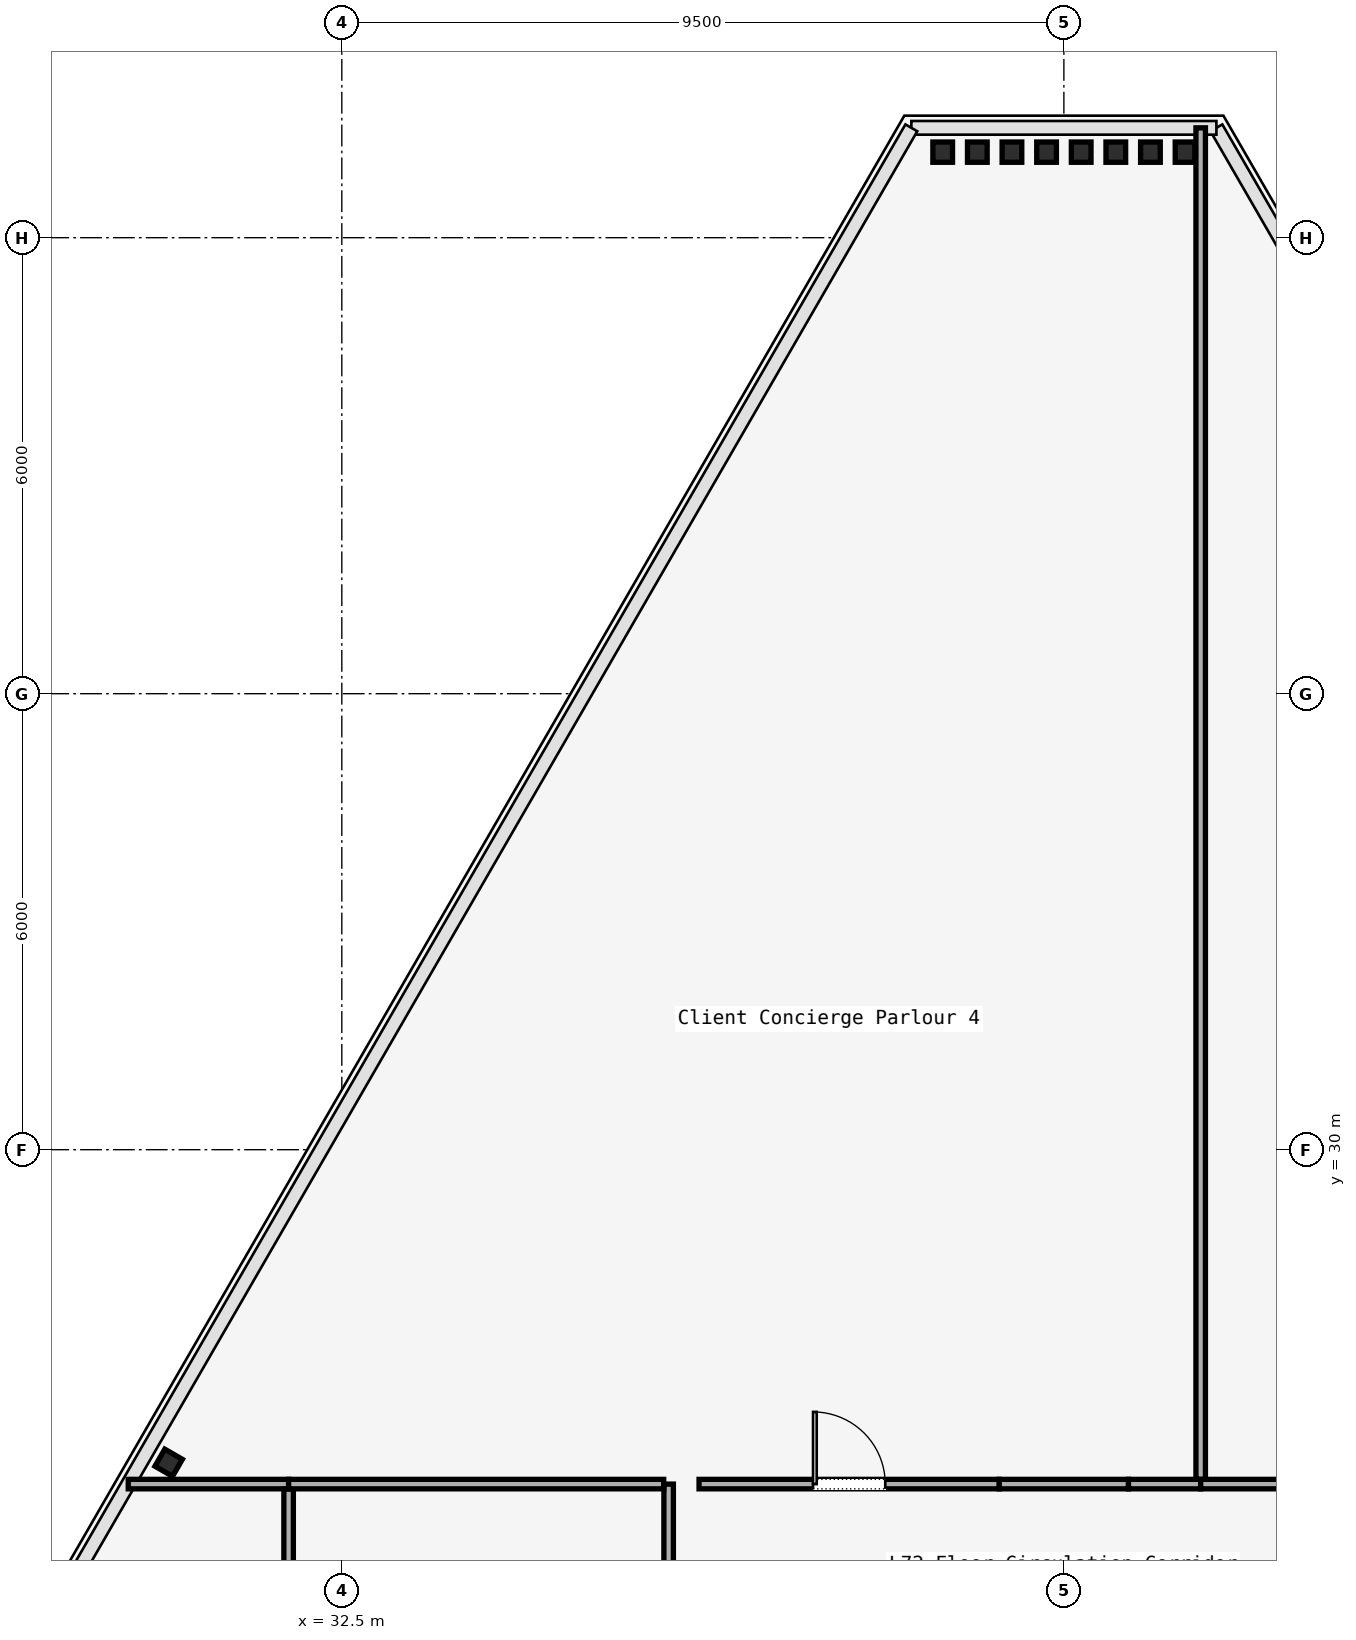
"""IFC4 building model, lengths in metres.
Left out: names, types, materials, properties, quantities, classifications, styles, units other than length and angle.
Written with IfcOpenShell. Run it as: python <this file> out.ifc"""

import sys

from ifc_helpers import new_model, si_unit, direction, frame, frame_2d, origin, origin_2d, place, context, subcontext, project, spatial, rectangle, i_section, extrude, element, fill, save


model = new_model("IFC4")
c1 = context("Model", 3, precision=1e-05, world=origin(), true_north=direction((0.0, 1.0)))
c2 = subcontext(c1, "Body", "Model", "MODEL_VIEW")
j1 = project(units=[si_unit("LENGTHUNIT", "METRE"), si_unit("PLANEANGLEUNIT", "RADIAN")], contexts=[c1])
p1 = place(None, origin())
s1 = spatial("IfcSite", under=j1, at=p1, CompositionType="ELEMENT")
p2 = place(p1, origin())
s2 = spatial("IfcBuilding", under=s1, at=p2, CompositionType="ELEMENT")
p3 = place(p2, frame((0.0, 0.0, 294.7)))
s3 = spatial("IfcBuildingStorey", under=s2, at=p3, CompositionType="ELEMENT", Elevation=294.7)
p4 = place(p3, frame((43.594, 43.125, 0.0), z_axis=(-0.021552704065, -0.034096239229, 0.999186132519), x_axis=(0.845284715511, -0.534316151471, 0.0)))
e1 = element("IfcColumn", 1, at=p4, inside=s3, PredefinedType="COLUMN", context=c2, shape_type="SweptSolid", body=[
    extrude(i_section(OverallWidth=0.259, OverallDepth=0.267, WebThickness=0.013, FlangeThickness=0.021, FilletRadius=0.013, at=origin_2d()), origin(), (0.0, 0.0, 1.0), 3.523),
])
p5 = place(p3, frame((43.139, 43.125, 0.0), z_axis=(-0.015455933932, -0.03410008742, 0.999298903304), x_axis=(0.910809744164, -0.412826367782, 0.0)))
e2 = element("IfcColumn", 2, at=p5, inside=s3, PredefinedType="COLUMN", context=c2, shape_type="SweptSolid", body=[
    extrude(i_section(OverallWidth=0.259, OverallDepth=0.267, WebThickness=0.013, FlangeThickness=0.021, FilletRadius=0.013, at=origin_2d()), origin(), (0.0, 0.0, 1.0), 3.522),
])
p6 = place(p3, frame((42.683, 43.125, 0.0), z_axis=(-0.009288131033, -0.034102690061, 0.999375173372), x_axis=(0.964854275814, -0.262785514144, 0.0)))
e3 = element("IfcColumn", 3, at=p6, inside=s3, PredefinedType="COLUMN", context=c2, shape_type="SweptSolid", body=[
    extrude(i_section(OverallWidth=0.259, OverallDepth=0.267, WebThickness=0.013, FlangeThickness=0.021, FilletRadius=0.013, at=origin_2d()), origin(), (0.0, 0.0, 1.0), 3.522),
])
for number, where, z_axis, x_axis in (
    (4, (42.228, 43.125, 0.0), (-0.003, -0.034, 0.999), (0.996, -0.091, 0.0)),
    (5, (41.772, 43.125, 0.0), (0.003, -0.034, 0.999), (0.996, 0.091, 0.0)),
):
    element("IfcColumn", number, at=place(p3, frame(where, z_axis=z_axis, x_axis=x_axis)), inside=s3, PredefinedType="COLUMN", context=c2, shape_type="SweptSolid", body=[
        extrude(i_section(OverallWidth=0.259, OverallDepth=0.267, WebThickness=0.013, FlangeThickness=0.021, FilletRadius=0.013, at=origin_2d()), origin(), (0.0, 0.0, 1.0), 3.522),
    ])
p7 = place(p3, frame((41.317, 43.125, 0.0), z_axis=(0.009288131033, -0.034102690061, 0.999375173372), x_axis=(0.964854275814, 0.262785514144, 0.0)))
e6 = element("IfcColumn", 6, at=p7, inside=s3, PredefinedType="COLUMN", context=c2, shape_type="SweptSolid", body=[
    extrude(i_section(OverallWidth=0.259, OverallDepth=0.267, WebThickness=0.013, FlangeThickness=0.021, FilletRadius=0.013, at=origin_2d()), origin(), (0.0, 0.0, 1.0), 3.522),
])
p8 = place(p3, frame((40.861, 43.125, 0.0), z_axis=(0.015455933932, -0.03410008742, 0.999298903304), x_axis=(0.910809744164, 0.412826367782, 0.0)))
e7 = element("IfcColumn", 7, at=p8, inside=s3, PredefinedType="COLUMN", context=c2, shape_type="SweptSolid", body=[
    extrude(i_section(OverallWidth=0.259, OverallDepth=0.267, WebThickness=0.013, FlangeThickness=0.021, FilletRadius=0.013, at=origin_2d()), origin(), (0.0, 0.0, 1.0), 3.522),
])
p9 = place(p3, frame((40.406, 43.125, 0.0), z_axis=(0.021552704065, -0.034096239229, 0.999186132519), x_axis=(0.845284715511, 0.534316151471, 0.0)))
e8 = element("IfcColumn", 8, at=p9, inside=s3, PredefinedType="COLUMN", context=c2, shape_type="SweptSolid", body=[
    extrude(i_section(OverallWidth=0.259, OverallDepth=0.267, WebThickness=0.013, FlangeThickness=0.021, FilletRadius=0.013, at=origin_2d()), origin(), (0.0, 0.0, 1.0), 3.523),
])
p10 = place(p3, frame((30.222, 25.881, 0.0), z_axis=(0.022172660725, -0.03838641888, 0.999016944782), x_axis=(0.000225551712, 0.999262773798, 0.038390858658)))
e9 = element("IfcColumn", 9, at=p10, inside=s3, PredefinedType="COLUMN", context=c2, shape_type="SweptSolid", body=[
    extrude(i_section(OverallWidth=0.259, OverallDepth=0.267, WebThickness=0.013, FlangeThickness=0.021, FilletRadius=0.013, at=origin_2d()), origin(), (0.0, 0.0, 1.0), 3.523),
])
p11 = place(p3, frame((36.8, 23.965, 0.0), z_axis=(0.0, 0.0, 1.0), x_axis=(0.0, 1.0, 0.0)))
e10 = element("IfcWall", 10, at=p11, inside=s3, PredefinedType="PARTITIONING", context=c2, shape_type="SweptSolid", body=[
    extrude(rectangle(XDim=1.635, YDim=0.125, at=frame_2d((0.817, 0.0))), origin(), (0.0, 0.0, 1.0), 2.95),
])
p12 = place(p3, frame((37.2, 25.6, 0.0), z_axis=(0.0, 0.0, 1.0), x_axis=(1.0, 0.0, 0.0)))
e11 = element("IfcWall", 11, at=p12, inside=s3, PredefinedType="PARTITIONING", context=c2, shape_type="SweptSolid", body=[
    extrude(rectangle(XDim=3.95, YDim=0.125, at=frame_2d((1.975, 0.0))), origin(), (0.0, 0.0, 1.0), 2.95),
])
p13 = place(p12, frame((1.5, 0.0, 0.0)))
e12 = element("IfcOpeningElement", 12, at=p13, cuts=e11, PredefinedType="OPENING", context=c2, shape_type="SweptSolid", body=[
    extrude(rectangle(XDim=0.95, YDim=2.2, at=frame_2d((0.475, 1.1))), frame((0.0, 0.062, 0.0), z_axis=(0.0, -1.0, 0.0), x_axis=(1.0, 0.0, 0.0)), (0.0, 0.0, 1.0), 0.125),
])
p14 = place(p3, frame((41.15, 25.6, 0.0), z_axis=(0.0, 0.0, 1.0), x_axis=(1.0, 0.0, 0.0)))
e13 = element("IfcWall", 13, at=p14, inside=s3, PredefinedType="PARTITIONING", context=c2, shape_type="SweptSolid", body=[
    extrude(rectangle(XDim=1.7, YDim=0.125, at=frame_2d((0.85, 0.0))), origin(), (0.0, 0.0, 1.0), 2.95),
])
p15 = place(p3, frame((42.85, 25.6, 0.0), z_axis=(0.0, 0.0, 1.0), x_axis=(1.0, 0.0, 0.0)))
e14 = element("IfcWall", 14, at=p15, inside=s3, PredefinedType="PARTITIONING", context=c2, shape_type="SweptSolid", body=[
    extrude(rectangle(XDim=0.95, YDim=0.125, at=frame_2d((0.475, 0.0))), origin(), (0.0, 0.0, 1.0), 2.95),
])
p16 = place(p3, frame((43.8, 25.6, 0.0), z_axis=(0.0, 0.0, 1.0), x_axis=(1.0, 0.0, 0.0)))
e15 = element("IfcWall", 15, at=p16, inside=s3, PredefinedType="PARTITIONING", context=c2, shape_type="SweptSolid", body=[
    extrude(rectangle(XDim=3.4, YDim=0.125, at=frame_2d((1.7, 0.0))), origin(), (0.0, 0.0, 1.0), 2.95),
])
p17 = place(p16, frame((1.225, 0.0, 0.0)))
e16 = element("IfcOpeningElement", 16, at=p17, cuts=e15, PredefinedType="OPENING", context=c2, shape_type="SweptSolid", body=[
    extrude(rectangle(XDim=0.95, YDim=2.2, at=frame_2d((0.475, 1.1))), frame((0.0, 0.062, 0.0), z_axis=(0.0, -1.0, 0.0), x_axis=(1.0, 0.0, 0.0)), (0.0, 0.0, 1.0), 0.125),
])
p18 = place(p3, frame((29.69, 25.6, 0.0), z_axis=(0.0, 0.0, 1.0), x_axis=(1.0, 0.0, 0.0)))
e17 = element("IfcWall", 17, at=p18, inside=s3, PredefinedType="PARTITIONING", context=c2, shape_type="SweptSolid", body=[
    extrude(rectangle(XDim=2.11, YDim=0.125, at=frame_2d((1.055, 0.0))), origin(), (0.0, 0.0, 1.0), 2.95),
])
p19 = place(p3, frame((31.8, 25.535, 0.0), z_axis=(0.0, 0.0, 1.0), x_axis=(0.0, -1.0, 0.0)))
e18 = element("IfcWall", 18, at=p19, inside=s3, PredefinedType="PARTITIONING", context=c2, shape_type="SweptSolid", body=[
    extrude(rectangle(XDim=8.47, YDim=0.125, at=frame_2d((4.235, 0.0))), origin(), (0.0, 0.0, 1.0), 2.95),
])
p20 = place(p3, frame((31.8, 25.6, 0.0), z_axis=(0.0, 0.0, 1.0), x_axis=(1.0, 0.0, 0.0)))
e19 = element("IfcWall", 19, at=p20, inside=s3, PredefinedType="PARTITIONING", context=c2, shape_type="SweptSolid", body=[
    extrude(rectangle(XDim=4.935, YDim=0.125, at=frame_2d((2.468, 0.0))), origin(), (0.0, 0.0, 1.0), 2.95),
])
p21 = place(p3, frame((43.8, 25.665, 0.0), z_axis=(0.0, 0.0, 1.0), x_axis=(0.0, 1.0, 0.0)))
e20 = element("IfcWall", 20, at=p21, inside=s3, PredefinedType="PARTITIONING", context=c2, shape_type="SweptSolid", body=[
    extrude(rectangle(XDim=17.781, YDim=0.125, at=frame_2d((8.89, 0.0))), origin(), (0.0, 0.0, 1.0), 2.95),
])
p22 = place(p13, origin())
e21 = element("IfcDoor", 21, at=p22, inside=s3, OperationType="SINGLE_SWING_RIGHT", PredefinedType="DOOR", context=c2, shape_type="SweptSolid", body=[
    extrude(rectangle(XDim=0.95, YDim=2.2, at=frame_2d((0.475, 1.1))), frame((0.0, 0.025, 0.0), z_axis=(0.0, -1.0, 0.0), x_axis=(1.0, 0.0, 0.0)), (0.0, 0.0, 1.0), 0.05),
])
fill(e12, e21)
save(model, sys.argv[1])
